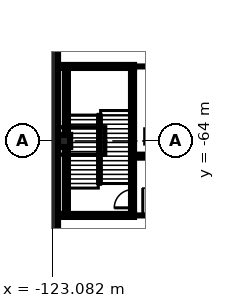
"""IFC4 building model, lengths in metres.
Left out: names, types, materials, properties, quantities, classifications, styles, units other than length and angle.
Written with IfcOpenShell. Run it as: python <this file> out.ifc"""

import sys

from ifc_helpers import new_model, si_unit, direction, frame, frame_2d, origin, origin_2d, place, context, subcontext, project, spatial, rectangle, extrude, element, fill, save


model = new_model("IFC4")
c1 = context("Model", 3, precision=1e-05, world=origin(), true_north=direction((0.0, 1.0)))
c2 = subcontext(c1, "Body", "Model", "MODEL_VIEW")
j1 = project(units=[si_unit("LENGTHUNIT", "METRE"), si_unit("PLANEANGLEUNIT", "RADIAN")], contexts=[c1])
p1 = place(None, origin())
s1 = spatial("IfcSite", under=j1, at=p1, CompositionType="ELEMENT")
p2 = place(p1, origin())
s2 = spatial("IfcBuilding", under=s1, at=p2, CompositionType="ELEMENT")
p3 = place(p2, frame((0.0, 0.0, -12.0)))
s3 = spatial("IfcBuildingStorey", under=s2, at=p3, CompositionType="ELEMENT", Elevation=-12.0)
p4 = place(p3, frame((-123.15, -80.0, 0.0), z_axis=(0.0, 0.0, 1.0), x_axis=(0.0, 1.0, 0.0)))
e1 = element("IfcWall", 1, at=p4, inside=s3, PredefinedType="USERDEFINED", context=c2, shape_type="SweptSolid", body=[
    extrude(rectangle(XDim=160.0, YDim=0.9, at=frame_2d((80.0, 0.0))), origin(), (0.0, 0.0, 1.0), 11.55),
])
p5 = place(p3, frame((-122.3, -64.0, 0.0), z_axis=(0.0, 0.0, 1.0), x_axis=(1.0, 0.0, 0.0)))
e2 = element("IfcColumn", 2, at=p5, inside=s3, PredefinedType="COLUMN", context=c2, shape_type="SweptSolid", body=[
    extrude(rectangle(XDim=0.8, YDim=0.8, at=origin_2d()), origin(), (0.0, 0.0, 1.0), 4.4),
])
p6 = place(p3, frame((-117.7, -68.9, 0.0), z_axis=(0.0, 0.0, 1.0), x_axis=(1.0, 0.0, 0.0)))
e3 = element("IfcWall", 3, at=p6, inside=s3, PredefinedType="PARTITIONING", context=c2, shape_type="SweptSolid", body=[
    extrude(rectangle(XDim=2.95, YDim=0.2, at=frame_2d((1.475, 0.0))), origin(), (0.0, 0.0, 1.0), 4.4),
])
p7 = place(p6, frame((0.575, 0.0, 0.0)))
e4 = element("IfcOpeningElement", 4, at=p7, cuts=e3, PredefinedType="OPENING", context=c2, shape_type="SweptSolid", body=[
    extrude(rectangle(XDim=1.8, YDim=2.1, at=frame_2d((0.9, 1.05))), frame((0.0, 0.11, 0.0), z_axis=(0.0, -1.0, 0.0), x_axis=(1.0, 0.0, 0.0)), (0.0, 0.0, 1.0), 0.22),
])
for number, where, z_axis, x_axis in (
    (5, (-117.7, -65.1, 0.0), (0.0, 0.0, 1.0), (1.0, 0.0, 0.0)),
    (6, (-117.7, -64.9, 0.0), (0.0, 0.0, 1.0), (1.0, 0.0, 0.0)),
):
    element("IfcWall", number, at=place(p3, frame(where, z_axis=z_axis, x_axis=x_axis)), inside=s3, PredefinedType="PARTITIONING", context=c2, shape_type="SweptSolid", body=[
        extrude(rectangle(XDim=2.95, YDim=0.2, at=frame_2d((1.475, 0.0))), origin(), (0.0, 0.0, 1.0), 4.4),
    ])
p8 = place(p3, frame((-117.7, -59.1, 0.0), z_axis=(0.0, 0.0, 1.0), x_axis=(1.0, 0.0, 0.0)))
e7 = element("IfcWall", 7, at=p8, inside=s3, PredefinedType="PARTITIONING", context=c2, shape_type="SweptSolid", body=[
    extrude(rectangle(XDim=2.95, YDim=0.2, at=frame_2d((1.475, 0.0))), origin(), (0.0, 0.0, 1.0), 4.4),
])
p9 = place(p8, frame((0.975, 0.0, 0.0)))
e8 = element("IfcOpeningElement", 8, at=p9, cuts=e7, PredefinedType="OPENING", context=c2, shape_type="SweptSolid", body=[
    extrude(rectangle(XDim=1.0, YDim=2.1, at=frame_2d((0.5, 1.05))), frame((0.0, 0.11, 0.0), z_axis=(0.0, -1.0, 0.0), x_axis=(1.0, 0.0, 0.0)), (0.0, 0.0, 1.0), 0.22),
])
p10 = place(p3, frame((-122.15, -68.8, 0.0), z_axis=(0.0, 0.0, 1.0), x_axis=(0.0, 1.0, 0.0)))
e9 = element("IfcWall", 9, at=p10, inside=s3, PredefinedType="SOLIDWALL", context=c2, shape_type="SweptSolid", body=[
    extrude(rectangle(XDim=9.6, YDim=0.2, at=frame_2d((4.8, 0.0))), origin(), (0.0, 0.0, 1.0), 4.4),
])
p11 = place(p3, frame((-117.8, -68.8, 0.0), z_axis=(0.0, 0.0, 1.0), x_axis=(0.0, 1.0, 0.0)))
e10 = element("IfcWall", 10, at=p11, inside=s3, PredefinedType="SOLIDWALL", context=c2, shape_type="SweptSolid", body=[
    extrude(rectangle(XDim=9.6, YDim=0.2, at=frame_2d((4.8, 0.0))), origin(), (0.0, 0.0, 1.0), 4.4),
])
p12 = place(p11, frame((0.4, 0.0, 0.0)))
e11 = element("IfcOpeningElement", 11, at=p12, cuts=e10, PredefinedType="OPENING", context=c2, shape_type="SweptSolid", body=[
    extrude(rectangle(XDim=1.2, YDim=2.1, at=frame_2d((0.6, 1.05))), frame((0.0, 0.11, 0.0), z_axis=(0.0, -1.0, 0.0), x_axis=(1.0, 0.0, 0.0)), (0.0, 0.0, 1.0), 0.22),
])
for number, where, z_axis, x_axis in (
    (12, (-117.7, -68.9, 0.0), (0.0, 0.0, 1.0), (-1.0, 0.0, 0.0)),
    (13, (-122.7, -59.1, 0.0), (0.0, 0.0, 1.0), (1.0, 0.0, 0.0)),
):
    element("IfcWall", number, at=place(p3, frame(where, z_axis=z_axis, x_axis=x_axis)), inside=s3, PredefinedType="SOLIDWALL", context=c2, shape_type="SweptSolid", body=[
        extrude(rectangle(XDim=5.0, YDim=0.2, at=frame_2d((2.5, 0.0))), origin(), (0.0, 0.0, 1.0), 4.4),
    ])
p13 = place(p7, origin())
e14 = element("IfcDoor", 14, at=p13, inside=s3, OperationType="DOUBLE_DOOR_SINGLE_SWING", PredefinedType="DOOR", context=c2, shape_type="SweptSolid", body=[
    extrude(rectangle(XDim=1.8, YDim=2.1, at=frame_2d((0.9, 1.05))), frame((0.0, 0.025, 0.0), z_axis=(0.0, -1.0, 0.0), x_axis=(1.0, 0.0, 0.0)), (0.0, 0.0, 1.0), 0.05),
])
fill(e4, e14)
p14 = place(p12, origin())
e15 = element("IfcDoor", 15, at=p14, inside=s3, OperationType="SINGLE_SWING_LEFT", PredefinedType="DOOR", context=c2, shape_type="SweptSolid", body=[
    extrude(rectangle(XDim=1.2, YDim=2.1, at=frame_2d((0.6, 1.05))), frame((0.0, 0.025, 0.0), z_axis=(0.0, -1.0, 0.0), x_axis=(1.0, 0.0, 0.0)), (0.0, 0.0, 1.0), 0.05),
])
fill(e11, e15)
save(model, sys.argv[1])
